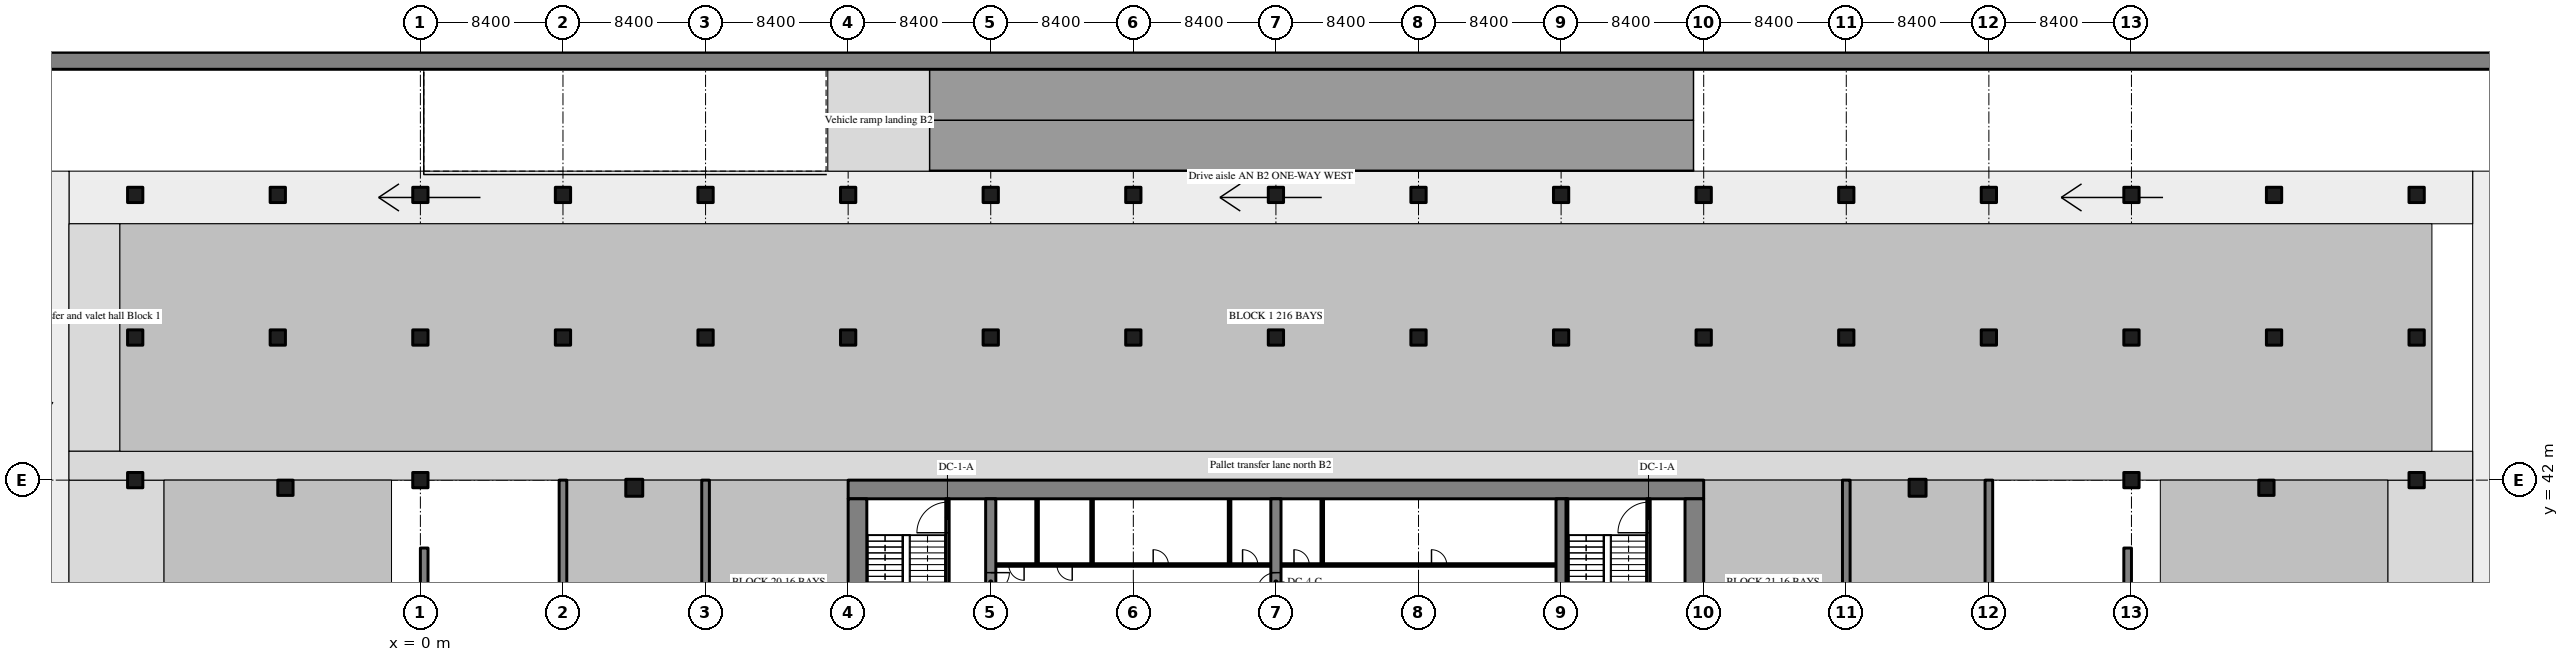
"""IFC4 building model, lengths in metres.
Left out: names, types, materials, properties, quantities, classifications, styles, units other than length and angle.
Written with IfcOpenShell. Run it as: python <this file> out.ifc"""

import sys

from ifc_helpers import new_model, si_unit, direction, frame, frame_2d, origin, origin_2d, place, context, subcontext, project, spatial, rectangle, extrude, source, transform, mapped, element, fill, save


model = new_model("IFC4")
c1 = context("Model", 3, precision=1e-05, world=origin(), true_north=direction((0.0, 1.0)))
c2 = subcontext(c1, "Body", "Model", "MODEL_VIEW")
j1 = project(units=[si_unit("LENGTHUNIT", "METRE"), si_unit("PLANEANGLEUNIT", "RADIAN")], contexts=[c1])
p1 = place(None, origin())
s1 = spatial("IfcSite", under=j1, at=p1, CompositionType="ELEMENT")
p2 = place(p1, origin())
s2 = spatial("IfcBuilding", under=s1, at=p2, CompositionType="ELEMENT")
p3 = place(p2, frame((0.0, 0.0, -9.0)))
s3 = spatial("IfcBuildingStorey", under=s2, at=p3, CompositionType="ELEMENT", Elevation=-9.0)
m1 = source(origin(), c2, "Body", "SweptSolid", [
    extrude(rectangle(XDim=151.2, YDim=1.0, at=frame_2d((75.6, 0.0))), origin(), (0.0, 0.0, 1.0), 4.22),
])
p4 = place(p3, frame((-25.2, 66.7, 0.0), z_axis=(0.0, 0.0, 1.0), x_axis=(1.0, 0.0, 0.0)))
e1 = element("IfcWall", 1, at=p4, inside=s3, PredefinedType="SHEAR", context=c2, shape_type="MappedRepresentation", body=[
    mapped(m1, transform((0.0, 0.0, 0.0), scale=1.0)),
])
m2 = source(origin(), c2, "Body", "SweptSolid", [
    extrude(rectangle(XDim=50.4, YDim=1.1, at=frame_2d((25.2, 0.0))), origin(), (0.0, 0.0, 1.0), 4.22),
])
p5 = place(p3, frame((25.2, 41.45, 0.0), z_axis=(0.0, 0.0, 1.0), x_axis=(1.0, 0.0, 0.0)))
e2 = element("IfcWall", 2, at=p5, inside=s3, PredefinedType="SHEAR", context=c2, shape_type="MappedRepresentation", body=[
    mapped(m2, transform((0.0, 0.0, 0.0), scale=1.0)),
])
m3 = source(origin(), c2, "Body", "SweptSolid", [
    extrude(rectangle(XDim=17.8, YDim=1.1, at=frame_2d((8.9, 0.0))), origin(), (0.0, 0.0, 1.0), 4.22),
])
for number, where, z_axis, x_axis in (
    (3, (25.75, 23.1, 0.0), (0.0, 0.0, 1.0), (0.0, 1.0, 0.0)),
    (4, (75.05, 23.1, 0.0), (0.0, 0.0, 1.0), (0.0, 1.0, 0.0)),
):
    element("IfcWall", number, at=place(p3, frame(where, z_axis=z_axis, x_axis=x_axis)), inside=s3, PredefinedType="SHEAR", context=c2, shape_type="MappedRepresentation", body=[
        mapped(m3, transform((0.0, 0.0, 0.0), scale=1.0)),
    ])
m4 = source(origin(), c2, "Body", "SweptSolid", [
    extrude(rectangle(XDim=17.8, YDim=0.6, at=frame_2d((8.9, 0.0))), origin(), (0.0, 0.0, 1.0), 4.22),
])
p6 = place(p3, frame((33.6, 23.1, 0.0), z_axis=(0.0, 0.0, 1.0), x_axis=(0.0, 1.0, 0.0)))
e5 = element("IfcWall", 5, at=p6, inside=s3, PredefinedType="SHEAR", context=c2, shape_type="MappedRepresentation", body=[
    mapped(m4, transform((0.0, 0.0, 0.0), scale=1.0)),
])
m5 = source(origin(), c2, "Body", "SweptSolid", [
    extrude(rectangle(XDim=1.1, YDim=2.1, at=frame_2d((0.55, 1.05))), frame((0.0, 0.31, 0.0), z_axis=(0.0, -1.0, 0.0), x_axis=(1.0, 0.0, 0.0)), (0.0, 0.0, 1.0), 0.62),
])
p7 = place(p6, frame((12.35, 0.0, 0.0)))
e6 = element("IfcOpeningElement", 6, at=p7, cuts=e5, PredefinedType="OPENING", context=c2, shape_type="MappedRepresentation", body=[
    mapped(m5, transform((0.0, 0.0, 0.0), scale=1.0)),
])
p8 = place(p3, frame((50.4, 23.1, 0.0), z_axis=(0.0, 0.0, 1.0), x_axis=(0.0, 1.0, 0.0)))
e7 = element("IfcWall", 7, at=p8, inside=s3, PredefinedType="SHEAR", context=c2, shape_type="MappedRepresentation", body=[
    mapped(m4, transform((0.0, 0.0, 0.0), scale=1.0)),
])
p9 = place(p8, frame((12.35, 0.0, 0.0)))
e8 = element("IfcOpeningElement", 8, at=p9, cuts=e7, PredefinedType="OPENING", context=c2, shape_type="MappedRepresentation", body=[
    mapped(m5, transform((0.0, 0.0, 0.0), scale=1.0)),
])
p10 = place(p3, frame((67.2, 23.1, 0.0), z_axis=(0.0, 0.0, 1.0), x_axis=(0.0, 1.0, 0.0)))
e9 = element("IfcWall", 9, at=p10, inside=s3, PredefinedType="SHEAR", context=c2, shape_type="MappedRepresentation", body=[
    mapped(m4, transform((0.0, 0.0, 0.0), scale=1.0)),
])
m6 = source(origin(), c2, "Body", "SweptSolid", [
    extrude(rectangle(XDim=16.0, YDim=0.45, at=frame_2d((8.0, 0.0))), origin(), (0.0, 0.0, 1.0), 4.22),
])
p11 = place(p3, frame((0.225, 22.0, 0.0), z_axis=(0.0, 0.0, 1.0), x_axis=(0.0, 1.0, 0.0)))
e10 = element("IfcWall", 10, at=p11, inside=s3, PredefinedType="SHEAR", context=c2, shape_type="MappedRepresentation", body=[
    mapped(m6, transform((0.0, 0.0, 0.0), scale=1.0)),
])
m7 = source(origin(), c2, "Body", "SweptSolid", [
    extrude(rectangle(XDim=20.0, YDim=0.45, at=frame_2d((10.0, 0.0))), origin(), (0.0, 0.0, 1.0), 4.22),
])
for number, where, z_axis, x_axis in (
    (11, (8.4, 22.0, 0.0), (0.0, 0.0, 1.0), (0.0, 1.0, 0.0)),
    (12, (16.8, 22.0, 0.0), (0.0, 0.0, 1.0), (0.0, 1.0, 0.0)),
    (13, (84.0, 22.0, 0.0), (0.0, 0.0, 1.0), (0.0, 1.0, 0.0)),
    (14, (92.4, 22.0, 0.0), (0.0, 0.0, 1.0), (0.0, 1.0, 0.0)),
):
    element("IfcWall", number, at=place(p3, frame(where, z_axis=z_axis, x_axis=x_axis)), inside=s3, PredefinedType="SHEAR", context=c2, shape_type="MappedRepresentation", body=[
        mapped(m7, transform((0.0, 0.0, 0.0), scale=1.0)),
    ])
p12 = place(p3, frame((100.575, 22.0, 0.0), z_axis=(0.0, 0.0, 1.0), x_axis=(0.0, 1.0, 0.0)))
e15 = element("IfcWall", 15, at=p12, inside=s3, PredefinedType="SHEAR", context=c2, shape_type="MappedRepresentation", body=[
    mapped(m6, transform((0.0, 0.0, 0.0), scale=1.0)),
])
m8 = source(origin(), c2, "Body", "SweptSolid", [
    extrude(rectangle(XDim=1.0, YDim=1.0, at=origin_2d()), origin(), (0.0, 0.0, 1.0), 4.22),
])
for number, where, z_axis, x_axis in (
    (16, (12.6, 41.55, 0.0), (0.0, 0.0, 1.0), (1.0, 0.0, 0.0)),
    (17, (88.2, 41.55, 0.0), (0.0, 0.0, 1.0), (1.0, 0.0, 0.0)),
):
    element("IfcColumn", number, at=place(p3, frame(where, z_axis=z_axis, x_axis=x_axis)), inside=s3, PredefinedType="COLUMN", context=c2, shape_type="MappedRepresentation", body=[
        mapped(m8, transform((0.0, 0.0, 0.0), scale=1.0)),
    ])
m9 = source(origin(), c2, "Body", "SweptSolid", [
    extrude(rectangle(XDim=0.9, YDim=0.9, at=origin_2d()), origin(), (0.0, 0.0, 1.0), 4.22),
])
for number, where, z_axis, x_axis in (
    (18, (-7.95, 41.55, 0.0), (0.0, 0.0, 1.0), (1.0, 0.0, 0.0)),
    (19, (108.75, 41.55, 0.0), (0.0, 0.0, 1.0), (1.0, 0.0, 0.0)),
    (20, (-16.8, 42.0, 0.0), (0.0, 0.0, 1.0), (1.0, 0.0, 0.0)),
    (21, (-16.8, 50.4, 0.0), (0.0, 0.0, 1.0), (1.0, 0.0, 0.0)),
    (22, (-16.8, 58.8, 0.0), (0.0, 0.0, 1.0), (1.0, 0.0, 0.0)),
    (23, (-8.4, 50.4, 0.0), (0.0, 0.0, 1.0), (1.0, 0.0, 0.0)),
    (24, (-8.4, 58.8, 0.0), (0.0, 0.0, 1.0), (1.0, 0.0, 0.0)),
    (25, (0.0, 42.0, 0.0), (0.0, 0.0, 1.0), (1.0, 0.0, 0.0)),
    (26, (0.0, 50.4, 0.0), (0.0, 0.0, 1.0), (1.0, 0.0, 0.0)),
    (27, (0.0, 58.8, 0.0), (0.0, 0.0, 1.0), (1.0, 0.0, 0.0)),
    (28, (8.4, 50.4, 0.0), (0.0, 0.0, 1.0), (1.0, 0.0, 0.0)),
    (29, (8.4, 58.8, 0.0), (0.0, 0.0, 1.0), (1.0, 0.0, 0.0)),
    (30, (16.8, 50.4, 0.0), (0.0, 0.0, 1.0), (1.0, 0.0, 0.0)),
    (31, (16.8, 58.8, 0.0), (0.0, 0.0, 1.0), (1.0, 0.0, 0.0)),
    (32, (25.2, 50.4, 0.0), (0.0, 0.0, 1.0), (1.0, 0.0, 0.0)),
    (33, (25.2, 58.8, 0.0), (0.0, 0.0, 1.0), (1.0, 0.0, 0.0)),
    (34, (33.6, 50.4, 0.0), (0.0, 0.0, 1.0), (1.0, 0.0, 0.0)),
    (35, (33.6, 58.8, 0.0), (0.0, 0.0, 1.0), (1.0, 0.0, 0.0)),
    (36, (42.0, 50.4, 0.0), (0.0, 0.0, 1.0), (1.0, 0.0, 0.0)),
    (37, (42.0, 58.8, 0.0), (0.0, 0.0, 1.0), (1.0, 0.0, 0.0)),
    (38, (50.4, 50.4, 0.0), (0.0, 0.0, 1.0), (1.0, 0.0, 0.0)),
    (39, (50.4, 58.8, 0.0), (0.0, 0.0, 1.0), (1.0, 0.0, 0.0)),
    (40, (58.8, 50.4, 0.0), (0.0, 0.0, 1.0), (1.0, 0.0, 0.0)),
    (41, (58.8, 58.8, 0.0), (0.0, 0.0, 1.0), (1.0, 0.0, 0.0)),
    (42, (67.2, 50.4, 0.0), (0.0, 0.0, 1.0), (1.0, 0.0, 0.0)),
    (43, (67.2, 58.8, 0.0), (0.0, 0.0, 1.0), (1.0, 0.0, 0.0)),
    (44, (75.6, 50.4, 0.0), (0.0, 0.0, 1.0), (1.0, 0.0, 0.0)),
    (45, (75.6, 58.8, 0.0), (0.0, 0.0, 1.0), (1.0, 0.0, 0.0)),
    (46, (84.0, 50.4, 0.0), (0.0, 0.0, 1.0), (1.0, 0.0, 0.0)),
    (47, (84.0, 58.8, 0.0), (0.0, 0.0, 1.0), (1.0, 0.0, 0.0)),
    (48, (92.4, 50.4, 0.0), (0.0, 0.0, 1.0), (1.0, 0.0, 0.0)),
    (49, (92.4, 58.8, 0.0), (0.0, 0.0, 1.0), (1.0, 0.0, 0.0)),
    (50, (100.8, 42.0, 0.0), (0.0, 0.0, 1.0), (1.0, 0.0, 0.0)),
    (51, (100.8, 50.4, 0.0), (0.0, 0.0, 1.0), (1.0, 0.0, 0.0)),
    (52, (100.8, 58.8, 0.0), (0.0, 0.0, 1.0), (1.0, 0.0, 0.0)),
    (53, (109.2, 50.4, 0.0), (0.0, 0.0, 1.0), (1.0, 0.0, 0.0)),
    (54, (109.2, 58.8, 0.0), (0.0, 0.0, 1.0), (1.0, 0.0, 0.0)),
    (55, (117.6, 42.0, 0.0), (0.0, 0.0, 1.0), (1.0, 0.0, 0.0)),
    (56, (117.6, 50.4, 0.0), (0.0, 0.0, 1.0), (1.0, 0.0, 0.0)),
    (57, (117.6, 58.8, 0.0), (0.0, 0.0, 1.0), (1.0, 0.0, 0.0)),
):
    element("IfcColumn", number, at=place(p3, frame(where, z_axis=z_axis, x_axis=x_axis)), inside=s3, PredefinedType="COLUMN", context=c2, shape_type="MappedRepresentation", body=[
        mapped(m9, transform((0.0, 0.0, 0.0), scale=1.0)),
    ])
m10 = source(origin(), c2, "Body", "SweptSolid", [
    extrude(rectangle(XDim=16.2, YDim=0.15, at=frame_2d((8.1, 0.0))), origin(), (0.0, 0.0, 1.0), 4.22),
])
p13 = place(p3, frame((33.9, 37.0, 0.0), z_axis=(0.0, 0.0, 1.0), x_axis=(1.0, 0.0, 0.0)))
e58 = element("IfcWall", 58, at=p13, inside=s3, PredefinedType="PARTITIONING", context=c2, shape_type="MappedRepresentation", body=[
    mapped(m10, transform((0.0, 0.0, 0.0), scale=1.0)),
])
m11 = source(origin(), c2, "Body", "SweptSolid", [
    extrude(rectangle(XDim=0.9, YDim=2.1, at=frame_2d((0.45, 1.05))), frame((0.0, 0.085, 0.0), z_axis=(0.0, -1.0, 0.0), x_axis=(1.0, 0.0, 0.0)), (0.0, 0.0, 1.0), 0.17),
])
p14 = place(p13, frame((0.765, 0.0, 0.0)))
e59 = element("IfcOpeningElement", 59, at=p14, cuts=e58, PredefinedType="OPENING", context=c2, shape_type="MappedRepresentation", body=[
    mapped(m11, transform((0.0, 0.0, 0.0), scale=1.0)),
])
p15 = place(p13, frame((3.6, 0.0, 0.0)))
e60 = element("IfcOpeningElement", 60, at=p15, cuts=e58, PredefinedType="OPENING", context=c2, shape_type="MappedRepresentation", body=[
    mapped(m11, transform((0.0, 0.0, 0.0), scale=1.0)),
])
p16 = place(p13, frame((9.27, 0.0, 0.0)))
e61 = element("IfcOpeningElement", 61, at=p16, cuts=e58, PredefinedType="OPENING", context=c2, shape_type="MappedRepresentation", body=[
    mapped(m11, transform((0.0, 0.0, 0.0), scale=1.0)),
])
p17 = place(p13, frame((14.535, 0.0, 0.0)))
e62 = element("IfcOpeningElement", 62, at=p17, cuts=e58, PredefinedType="OPENING", context=c2, shape_type="MappedRepresentation", body=[
    mapped(m11, transform((0.0, 0.0, 0.0), scale=1.0)),
])
m12 = source(origin(), c2, "Body", "SweptSolid", [
    extrude(rectangle(XDim=3.9, YDim=0.15, at=frame_2d((1.95, 0.0))), origin(), (0.0, 0.0, 1.0), 4.22),
])
for number, where, z_axis, x_axis in (
    (63, (36.33, 37.0, 0.0), (0.0, 0.0, 1.0), (0.0, 1.0, 0.0)),
    (64, (39.57, 37.0, 0.0), (0.0, 0.0, 1.0), (0.0, 1.0, 0.0)),
    (65, (47.67, 37.0, 0.0), (0.0, 0.0, 1.0), (0.0, 1.0, 0.0)),
):
    element("IfcWall", number, at=place(p3, frame(where, z_axis=z_axis, x_axis=x_axis)), inside=s3, PredefinedType="PARTITIONING", context=c2, shape_type="MappedRepresentation", body=[
        mapped(m12, transform((0.0, 0.0, 0.0), scale=1.0)),
    ])
m13 = source(origin(), c2, "Body", "SweptSolid", [
    extrude(rectangle(XDim=16.2, YDim=0.15, at=frame_2d((8.1, 0.0))), origin(), (0.0, 0.0, 1.0), 4.22),
])
p18 = place(p3, frame((66.9, 37.0, 0.0), z_axis=(0.0, 0.0, 1.0), x_axis=(-1.0, 0.0, 0.0)))
e66 = element("IfcWall", 66, at=p18, inside=s3, PredefinedType="PARTITIONING", context=c2, shape_type="MappedRepresentation", body=[
    mapped(m13, transform((0.0, 0.0, 0.0), scale=1.0)),
])
p19 = place(p18, frame((6.435, 0.0, 0.0)))
e67 = element("IfcOpeningElement", 67, at=p19, cuts=e66, PredefinedType="OPENING", context=c2, shape_type="MappedRepresentation", body=[
    mapped(m11, transform((0.0, 0.0, 0.0), scale=1.0)),
])
p20 = place(p18, frame((14.535, 0.0, 0.0)))
e68 = element("IfcOpeningElement", 68, at=p20, cuts=e66, PredefinedType="OPENING", context=c2, shape_type="MappedRepresentation", body=[
    mapped(m11, transform((0.0, 0.0, 0.0), scale=1.0)),
])
p21 = place(p3, frame((53.13, 37.0, 0.0), z_axis=(0.0, 0.0, 1.0), x_axis=(0.0, 1.0, 0.0)))
e69 = element("IfcWall", 69, at=p21, inside=s3, PredefinedType="PARTITIONING", context=c2, shape_type="MappedRepresentation", body=[
    mapped(m12, transform((0.0, 0.0, 0.0), scale=1.0)),
])
m14 = source(origin(), c2, "Body", "SweptSolid", [
    extrude(rectangle(XDim=7.3, YDim=0.2, at=frame_2d((3.65, 0.0))), origin(), (0.0, 0.0, 1.0), 4.22),
])
p22 = place(p3, frame((31.05, 33.6, 0.0), z_axis=(0.0, 0.0, 1.0), x_axis=(0.0, 1.0, 0.0)))
e70 = element("IfcWall", 70, at=p22, inside=s3, PredefinedType="SOLIDWALL", context=c2, shape_type="MappedRepresentation", body=[
    mapped(m14, transform((0.0, 0.0, 0.0), scale=1.0)),
])
m15 = source(origin(), c2, "Body", "SweptSolid", [
    extrude(rectangle(XDim=1.8, YDim=2.1, at=frame_2d((0.9, 1.05))), frame((0.0, 0.11, 0.0), z_axis=(0.0, -1.0, 0.0), x_axis=(1.0, 0.0, 0.0)), (0.0, 0.0, 1.0), 0.22),
])
p23 = place(p22, frame((5.3, 0.0, 0.0)))
e71 = element("IfcOpeningElement", 71, at=p23, cuts=e70, PredefinedType="OPENING", context=c2, shape_type="MappedRepresentation", body=[
    mapped(m15, transform((0.0, 0.0, 0.0), scale=1.0)),
])
p24 = place(p3, frame((72.35, 33.6, 0.0), z_axis=(0.0, 0.0, 1.0), x_axis=(0.0, 1.0, 0.0)))
e72 = element("IfcWall", 72, at=p24, inside=s3, PredefinedType="SOLIDWALL", context=c2, shape_type="MappedRepresentation", body=[
    mapped(m14, transform((0.0, 0.0, 0.0), scale=1.0)),
])
p25 = place(p24, frame((5.3, 0.0, 0.0)))
e73 = element("IfcOpeningElement", 73, at=p25, cuts=e72, PredefinedType="OPENING", context=c2, shape_type="MappedRepresentation", body=[
    mapped(m15, transform((0.0, 0.0, 0.0), scale=1.0)),
])
m16 = source(origin(), c2, "Body", "SweptSolid", [
    extrude(rectangle(XDim=8.1, YDim=0.1, at=frame_2d((4.05, 0.0))), origin(), (0.0, 0.0, 1.0), 4.22),
])
p26 = place(p3, frame((67.55, 32.8, 0.0), z_axis=(0.0, 0.0, 1.0), x_axis=(0.0, 1.0, 0.0)))
e74 = element("IfcWall", 74, at=p26, inside=s3, PredefinedType="SOLIDWALL", context=c2, shape_type="MappedRepresentation", body=[
    mapped(m16, transform((0.0, 0.0, 0.0), scale=1.0)),
])
m17 = source(origin(), c2, "Body", "SweptSolid", [
    extrude(rectangle(XDim=0.9, YDim=2.1, at=frame_2d((0.45, 1.05))), frame((0.0, 0.025, 0.0), z_axis=(0.0, -1.0, 0.0), x_axis=(1.0, 0.0, 0.0)), (0.0, 0.0, 1.0), 0.05),
])
p27 = place(p14, origin())
e75 = element("IfcDoor", 75, at=p27, inside=s3, OperationType="SINGLE_SWING_RIGHT", PredefinedType="DOOR", context=c2, shape_type="MappedRepresentation", body=[
    mapped(m17, transform((0.0, 0.0, 0.0), scale=1.0)),
])
fill(e59, e75)
p28 = place(p15, origin())
e76 = element("IfcDoor", 76, at=p28, inside=s3, OperationType="SINGLE_SWING_RIGHT", PredefinedType="DOOR", context=c2, shape_type="MappedRepresentation", body=[
    mapped(m17, transform((0.0, 0.0, 0.0), scale=1.0)),
])
fill(e60, e76)
p29 = place(p16, origin())
e77 = element("IfcDoor", 77, at=p29, inside=s3, OperationType="SINGLE_SWING_LEFT", PredefinedType="DOOR", context=c2, shape_type="MappedRepresentation", body=[
    mapped(m17, transform((0.0, 0.0, 0.0), scale=1.0)),
])
fill(e61, e77)
p30 = place(p17, origin())
e78 = element("IfcDoor", 78, at=p30, inside=s3, OperationType="SINGLE_SWING_LEFT", PredefinedType="DOOR", context=c2, shape_type="MappedRepresentation", body=[
    mapped(m17, transform((0.0, 0.0, 0.0), scale=1.0)),
])
fill(e62, e78)
p31 = place(p19, origin())
e79 = element("IfcDoor", 79, at=p31, inside=s3, OperationType="SINGLE_SWING_RIGHT", PredefinedType="DOOR", context=c2, shape_type="MappedRepresentation", body=[
    mapped(m17, transform((0.0, 0.0, 0.0), scale=1.0)),
])
fill(e67, e79)
p32 = place(p20, origin())
e80 = element("IfcDoor", 80, at=p32, inside=s3, OperationType="SINGLE_SWING_RIGHT", PredefinedType="DOOR", context=c2, shape_type="MappedRepresentation", body=[
    mapped(m17, transform((0.0, 0.0, 0.0), scale=1.0)),
])
fill(e68, e80)
m18 = source(origin(), c2, "Body", "SweptSolid", [
    extrude(rectangle(XDim=1.8, YDim=2.1, at=frame_2d((0.9, 1.05))), frame((0.0, 0.025, 0.0), z_axis=(0.0, -1.0, 0.0), x_axis=(1.0, 0.0, 0.0)), (0.0, 0.0, 1.0), 0.05),
])
p33 = place(p23, origin())
e81 = element("IfcDoor", 81, at=p33, inside=s3, OperationType="SINGLE_SWING_LEFT", PredefinedType="DOOR", context=c2, shape_type="MappedRepresentation", body=[
    mapped(m18, transform((0.0, 0.0, 0.0), scale=1.0)),
])
fill(e71, e81)
p34 = place(p25, origin())
e82 = element("IfcDoor", 82, at=p34, inside=s3, OperationType="SINGLE_SWING_LEFT", PredefinedType="DOOR", context=c2, shape_type="MappedRepresentation", body=[
    mapped(m18, transform((0.0, 0.0, 0.0), scale=1.0)),
])
fill(e73, e82)
m19 = source(origin(), c2, "Body", "SweptSolid", [
    extrude(rectangle(XDim=1.1, YDim=2.1, at=frame_2d((0.55, 1.05))), frame((0.0, 0.025, 0.0), z_axis=(0.0, -1.0, 0.0), x_axis=(1.0, 0.0, 0.0)), (0.0, 0.0, 1.0), 0.05),
])
p35 = place(p7, origin())
e83 = element("IfcDoor", 83, at=p35, inside=s3, OperationType="SINGLE_SWING_RIGHT", PredefinedType="DOOR", context=c2, shape_type="MappedRepresentation", body=[
    mapped(m19, transform((0.0, 0.0, 0.0), scale=1.0)),
])
fill(e6, e83)
p36 = place(p9, origin())
e84 = element("IfcDoor", 84, at=p36, inside=s3, OperationType="SINGLE_SWING_LEFT", PredefinedType="DOOR", context=c2, shape_type="MappedRepresentation", body=[
    mapped(m19, transform((0.0, 0.0, 0.0), scale=1.0)),
])
fill(e8, e84)
save(model, sys.argv[1])
